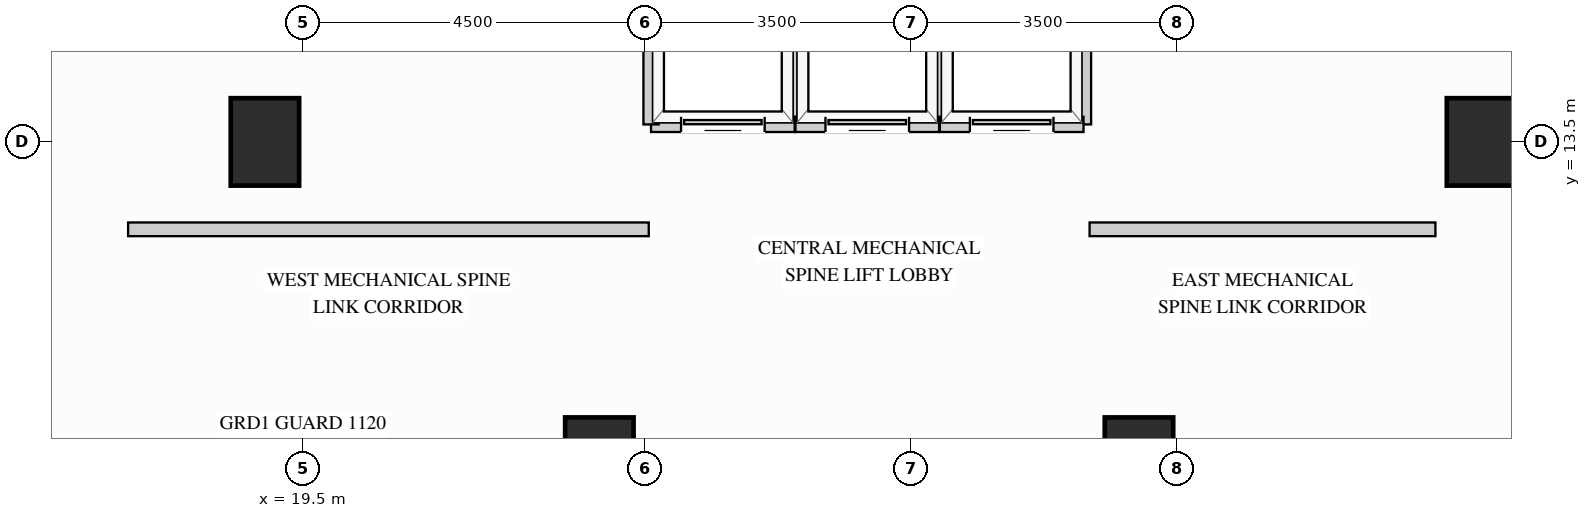
"""IFC4 building model, lengths in metres.
Left out: names, types, materials, properties, quantities, classifications, styles, units other than length and angle.
Written with IfcOpenShell. Run it as: python <this file> out.ifc"""

import sys

from ifc_helpers import new_model, si_unit, direction, frame, frame_2d, origin, origin_2d, place, context, subcontext, project, spatial, rectangle, extrude, source, transform, mapped, element, fill, save


model = new_model("IFC4")
c1 = context("Model", 3, precision=1e-05, world=origin(), true_north=direction((0.0, 1.0)))
c2 = subcontext(c1, "Body", "Model", "MODEL_VIEW")
j1 = project(units=[si_unit("LENGTHUNIT", "METRE"), si_unit("PLANEANGLEUNIT", "RADIAN")], contexts=[c1])
p1 = place(None, origin())
s1 = spatial("IfcSite", under=j1, at=p1, CompositionType="ELEMENT")
p2 = place(p1, origin())
s2 = spatial("IfcBuilding", under=s1, at=p2, CompositionType="ELEMENT")
p3 = place(p2, frame((0.0, 0.0, 138.6)))
s3 = spatial("IfcBuildingStorey", under=s2, at=p3, CompositionType="ELEMENT", Elevation=138.6)
m1 = source(origin(), c2, "Body", "SweptSolid", [
    extrude(rectangle(XDim=0.9, YDim=1.15, at=origin_2d()), origin(), (0.0, 0.0, 1.0), 4.26),
])
for number, where, z_axis, x_axis in (
    (1, (19.0, 13.5, 0.0), (0.0, 0.0, 1.0), (1.0, 0.0, 0.0)),
    (2, (35.0, 13.5, 0.0), (0.0, 0.0, 1.0), (1.0, 0.0, 0.0)),
    (3, (23.4, 9.3, 0.0), (0.0, 0.0, 1.0), (1.0, 0.0, 0.0)),
    (4, (30.5, 9.3, 0.0), (0.0, 0.0, 1.0), (1.0, 0.0, 0.0)),
):
    element("IfcColumn", number, at=place(p3, frame(where, z_axis=z_axis, x_axis=x_axis)), inside=s3, PredefinedType="COLUMN", context=c2, shape_type="MappedRepresentation", body=[
        mapped(m1, transform((0.0, 0.0, 0.0), x_axis=(1.0, 0.0, 0.0), y_axis=(0.0, 1.0, 0.0), z_axis=(0.0, 0.0, 1.0))),
    ])
m2 = source(origin(), c2, "Body", "SweptSolid", [
    extrude(rectangle(XDim=6.85, YDim=0.18, at=frame_2d((3.425, 0.0))), origin(), (0.0, 0.0, 1.0), 4.245),
])
p4 = place(p3, frame((17.2, 12.35, 0.0), z_axis=(0.0, 0.0, 1.0), x_axis=(1.0, 0.0, 0.0)))
e5 = element("IfcWall", 5, at=p4, inside=s3, PredefinedType="PARTITIONING", context=c2, shape_type="MappedRepresentation", body=[
    mapped(m2, transform((0.0, 0.0, 0.0), x_axis=(1.0, 0.0, 0.0), y_axis=(0.0, 1.0, 0.0), z_axis=(0.0, 0.0, 1.0))),
])
m3 = source(origin(), c2, "Body", "SweptSolid", [
    extrude(rectangle(XDim=4.55, YDim=0.18, at=frame_2d((2.275, 0.0))), origin(), (0.0, 0.0, 1.0), 4.245),
])
p5 = place(p3, frame((29.85, 12.35, 0.0), z_axis=(0.0, 0.0, 1.0), x_axis=(1.0, 0.0, 0.0)))
e6 = element("IfcWall", 6, at=p5, inside=s3, PredefinedType="PARTITIONING", context=c2, shape_type="MappedRepresentation", body=[
    mapped(m3, transform((0.0, 0.0, 0.0), x_axis=(1.0, 0.0, 0.0), y_axis=(0.0, 1.0, 0.0), z_axis=(0.0, 0.0, 1.0))),
])
m4 = source(origin(), c2, "Body", "SweptSolid", [
    extrude(rectangle(XDim=2.29, YDim=0.2, at=frame_2d((1.145, 0.0))), origin(), (0.0, 0.0, 1.0), 4.245),
])
p6 = place(p3, frame((25.97, 13.73, 0.0), z_axis=(0.0, 0.0, 1.0), x_axis=(0.0, 1.0, 0.0)))
e7 = element("IfcWall", 7, at=p6, inside=s3, PredefinedType="PARTITIONING", context=c2, shape_type="MappedRepresentation", body=[
    mapped(m4, transform((0.0, 0.0, 0.0), x_axis=(1.0, 0.0, 0.0), y_axis=(0.0, 1.0, 0.0), z_axis=(0.0, 0.0, 1.0))),
])
p7 = place(p3, frame((24.08, 13.73, 0.0), z_axis=(0.0, 0.0, 1.0), x_axis=(1.0, 0.0, 0.0)))
e8 = element("IfcWall", 8, at=p7, inside=s3, PredefinedType="PARTITIONING", context=c2, shape_type="SweptSolid", body=[
    extrude(rectangle(XDim=1.89, YDim=0.2, at=frame_2d((0.945, 0.0))), origin(), (0.0, 0.0, 1.0), 3.326),
])
p8 = place(p7, frame((0.395, 0.0, 0.0)))
e9 = element("IfcOpeningElement", 9, at=p8, cuts=e8, PredefinedType="OPENING", context=c2, shape_type="SweptSolid", body=[
    extrude(rectangle(XDim=1.1, YDim=2.2, at=frame_2d((0.55, 1.1))), frame((0.0, 0.11, 0.0), z_axis=(0.0, -1.0, 0.0), x_axis=(1.0, 0.0, 0.0)), (0.0, 0.0, 1.0), 0.22),
])
for number, where, z_axis, x_axis in (
    (10, (24.08, 13.73, 0.0), (0.0, 0.0, 1.0), (0.0, 1.0, 0.0)),
    (11, (27.87, 13.73, 0.0), (0.0, 0.0, 1.0), (0.0, 1.0, 0.0)),
):
    element("IfcWall", number, at=place(p3, frame(where, z_axis=z_axis, x_axis=x_axis)), inside=s3, PredefinedType="PARTITIONING", context=c2, shape_type="MappedRepresentation", body=[
        mapped(m4, transform((0.0, 0.0, 0.0), x_axis=(1.0, 0.0, 0.0), y_axis=(0.0, 1.0, 0.0), z_axis=(0.0, 0.0, 1.0))),
    ])
p9 = place(p3, frame((25.98, 13.73, 0.0), z_axis=(0.0, 0.0, 1.0), x_axis=(1.0, 0.0, 0.0)))
e12 = element("IfcWall", 12, at=p9, inside=s3, PredefinedType="PARTITIONING", context=c2, shape_type="SweptSolid", body=[
    extrude(rectangle(XDim=1.89, YDim=0.2, at=frame_2d((0.945, 0.0))), origin(), (0.0, 0.0, 1.0), 3.326),
])
p10 = place(p9, frame((0.395, 0.0, 0.0)))
e13 = element("IfcOpeningElement", 13, at=p10, cuts=e12, PredefinedType="OPENING", context=c2, shape_type="SweptSolid", body=[
    extrude(rectangle(XDim=1.1, YDim=2.2, at=frame_2d((0.55, 1.1))), frame((0.0, 0.11, 0.0), z_axis=(0.0, -1.0, 0.0), x_axis=(1.0, 0.0, 0.0)), (0.0, 0.0, 1.0), 0.22),
])
p11 = place(p3, frame((29.77, 13.73, 0.0), z_axis=(0.0, 0.0, 1.0), x_axis=(0.0, 1.0, 0.0)))
e14 = element("IfcWall", 14, at=p11, inside=s3, PredefinedType="PARTITIONING", context=c2, shape_type="MappedRepresentation", body=[
    mapped(m4, transform((0.0, 0.0, 0.0), x_axis=(1.0, 0.0, 0.0), y_axis=(0.0, 1.0, 0.0), z_axis=(0.0, 0.0, 1.0))),
])
p12 = place(p3, frame((27.88, 13.73, 0.0), z_axis=(0.0, 0.0, 1.0), x_axis=(1.0, 0.0, 0.0)))
e15 = element("IfcWall", 15, at=p12, inside=s3, PredefinedType="PARTITIONING", context=c2, shape_type="SweptSolid", body=[
    extrude(rectangle(XDim=1.89, YDim=0.2, at=frame_2d((0.945, 0.0))), origin(), (0.0, 0.0, 1.0), 3.326),
])
p13 = place(p12, frame((0.395, 0.0, 0.0)))
e16 = element("IfcOpeningElement", 16, at=p13, cuts=e15, PredefinedType="OPENING", context=c2, shape_type="SweptSolid", body=[
    extrude(rectangle(XDim=1.1, YDim=2.2, at=frame_2d((0.55, 1.1))), frame((0.0, 0.11, 0.0), z_axis=(0.0, -1.0, 0.0), x_axis=(1.0, 0.0, 0.0)), (0.0, 0.0, 1.0), 0.22),
])
m5 = source(origin(), c2, "Body", "SweptSolid", [
    extrude(rectangle(XDim=1.1, YDim=2.2, at=frame_2d((0.55, 1.1))), frame((0.0, 0.025, 0.0), z_axis=(0.0, -1.0, 0.0), x_axis=(1.0, 0.0, 0.0)), (0.0, 0.0, 1.0), 0.05),
])
p14 = place(p8, origin())
e17 = element("IfcDoor", 17, at=p14, inside=s3, OperationType="SLIDING_TO_LEFT", PredefinedType="DOOR", context=c2, shape_type="MappedRepresentation", body=[
    mapped(m5, transform((0.0, 0.0, 0.0), x_axis=(1.0, 0.0, 0.0), y_axis=(0.0, 1.0, 0.0), z_axis=(0.0, 0.0, 1.0))),
])
fill(e9, e17)
p15 = place(p10, origin())
e18 = element("IfcDoor", 18, at=p15, inside=s3, OperationType="SLIDING_TO_LEFT", PredefinedType="DOOR", context=c2, shape_type="MappedRepresentation", body=[
    mapped(m5, transform((0.0, 0.0, 0.0), x_axis=(1.0, 0.0, 0.0), y_axis=(0.0, 1.0, 0.0), z_axis=(0.0, 0.0, 1.0))),
])
fill(e13, e18)
p16 = place(p13, origin())
e19 = element("IfcDoor", 19, at=p16, inside=s3, OperationType="SLIDING_TO_LEFT", PredefinedType="DOOR", context=c2, shape_type="MappedRepresentation", body=[
    mapped(m5, transform((0.0, 0.0, 0.0), x_axis=(1.0, 0.0, 0.0), y_axis=(0.0, 1.0, 0.0), z_axis=(0.0, 0.0, 1.0))),
])
fill(e16, e19)
save(model, sys.argv[1])
